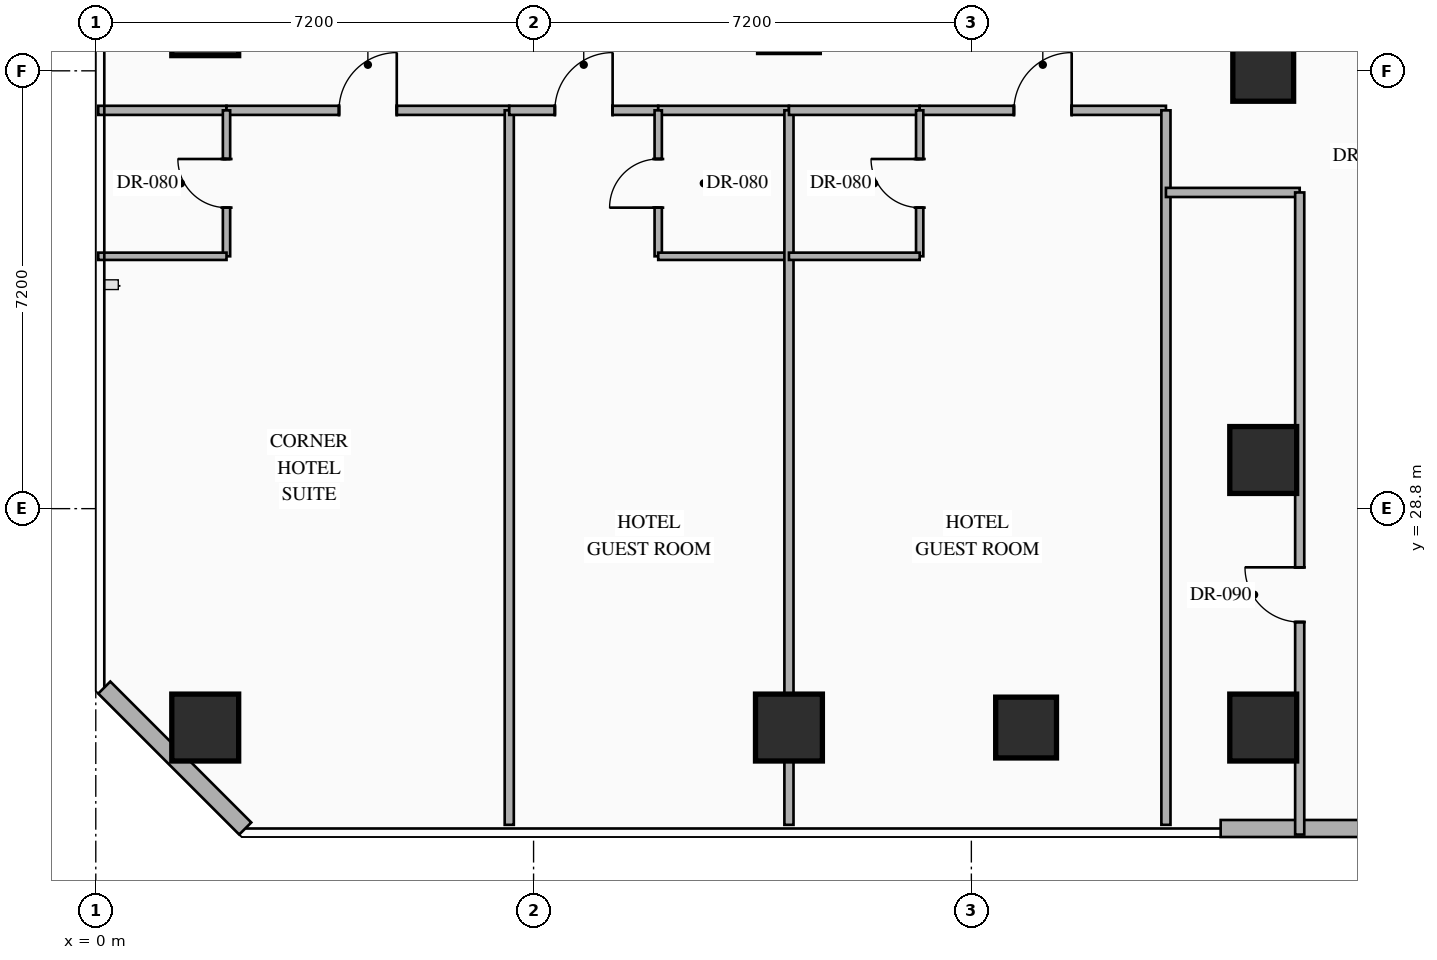
"""IFC4 building model, lengths in metres.
Left out: names, types, materials, properties, quantities, classifications, styles, units other than length and angle.
Written with IfcOpenShell. Run it as: python <this file> out.ifc"""

import sys

from ifc_helpers import new_model, si_unit, direction, frame, frame_2d, origin, origin_2d, place, context, subcontext, project, spatial, rectangle, hollow_rectangle, extrude, element, fill, save


model = new_model("IFC4")
c1 = context("Model", 3, precision=1e-05, world=origin(), true_north=direction((0.0, 1.0)))
c2 = subcontext(c1, "Body", "Model", "MODEL_VIEW")
j1 = project(units=[si_unit("LENGTHUNIT", "METRE"), si_unit("PLANEANGLEUNIT", "RADIAN")], contexts=[c1])
p1 = place(None, origin())
s1 = spatial("IfcSite", under=j1, at=p1, CompositionType="ELEMENT")
p2 = place(p1, origin())
s2 = spatial("IfcBuilding", under=s1, at=p2, CompositionType="ELEMENT")
p3 = place(p2, frame((0.0, 0.0, 60.05)))
s3 = spatial("IfcBuildingStorey", under=s2, at=p3, CompositionType="ELEMENT", Elevation=60.05)
for number, where, z_axis, x_axis in (
    (1, (1.8, 25.2, 0.0), (0.0, 0.0, 1.0), (1.0, 0.0, 0.0)),
    (2, (1.8, 36.8, 0.0), (0.0, 0.0, 1.0), (1.0, 0.0, 0.0)),
    (3, (11.4, 25.2, 0.0), (0.0, 0.0, 1.0), (1.0, 0.0, 0.0)),
    (4, (19.2, 25.2, 0.0), (0.0, 0.0, 1.0), (1.0, 0.0, 0.0)),
    (5, (19.2, 29.6, 0.0), (0.0, 0.0, 1.0), (1.0, 0.0, 0.0)),
):
    element("IfcColumn", number, at=place(p3, frame(where, z_axis=z_axis, x_axis=x_axis)), inside=s3, PredefinedType="COLUMN", context=c2, shape_type="SweptSolid", body=[
        extrude(hollow_rectangle(XDim=1.1, YDim=1.1, WallThickness=0.04, at=origin_2d()), origin(), (0.0, 0.0, 1.0), 3.35),
    ])
for number, where, z_axis, x_axis in (
    (6, (19.2, 36.0, 0.0), (0.0, 0.0, 1.0), (1.0, 0.0, 0.0)),
    (7, (15.3, 25.2, 0.0), (0.0, 0.0, 1.0), (1.0, 0.0, 0.0)),
):
    element("IfcColumn", number, at=place(p3, frame(where, z_axis=z_axis, x_axis=x_axis)), inside=s3, PredefinedType="COLUMN", context=c2, shape_type="SweptSolid", body=[
        extrude(hollow_rectangle(XDim=1.0, YDim=1.0, WallThickness=0.038, at=origin_2d()), origin(), (0.0, 0.0, 1.0), 3.35),
    ])
p4 = place(p3, frame((25.247, 23.54, 0.0), z_axis=(0.0, 0.0, 1.0), x_axis=(-1.0, 0.0, 0.0)))
e8 = element("IfcWall", 8, at=p4, inside=s3, PredefinedType="STANDARD", context=c2, shape_type="SweptSolid", body=[
    extrude(rectangle(XDim=6.747, YDim=0.28, at=frame_2d((3.374, 0.0))), origin(), (0.0, 0.0, 1.0), 3.13),
])
p5 = place(p3, frame((2.458, 23.54, 0.0), z_axis=(0.0, 0.0, 1.0), x_axis=(-0.707144017911, 0.707069542501, 0.0)))
e9 = element("IfcWall", 9, at=p5, inside=s3, PredefinedType="STANDARD", context=c2, shape_type="SweptSolid", body=[
    extrude(rectangle(XDim=3.278, YDim=0.28, at=frame_2d((1.639, 0.0))), origin(), (0.0, 0.0, 1.0), 3.13),
])
p6 = place(p3, frame((0.04, 35.35, 0.0), z_axis=(0.0, 0.0, 1.0), x_axis=(1.0, 0.0, 0.0)))
e10 = element("IfcWall", 10, at=p6, inside=s3, PredefinedType="PARTITIONING", context=c2, shape_type="SweptSolid", body=[
    extrude(rectangle(XDim=2.11, YDim=0.15, at=frame_2d((1.055, 0.0))), origin(), (0.0, 0.0, 1.0), 3.13),
])
p7 = place(p3, frame((2.15, 35.35, 0.0), z_axis=(0.0, 0.0, 1.0), x_axis=(1.0, 0.0, 0.0)))
e11 = element("IfcWall", 11, at=p7, inside=s3, PredefinedType="PARTITIONING", context=c2, shape_type="SweptSolid", body=[
    extrude(rectangle(XDim=4.65, YDim=0.15, at=frame_2d((2.325, 0.0))), origin(), (0.0, 0.0, 1.0), 3.13),
])
p8 = place(p7, frame((1.85, 0.0, 0.0)))
e12 = element("IfcOpeningElement", 12, at=p8, cuts=e11, PredefinedType="OPENING", context=c2, shape_type="SweptSolid", body=[
    extrude(rectangle(XDim=0.95, YDim=2.15, at=frame_2d((0.475, 1.075))), frame((0.0, 0.085, 0.0), z_axis=(0.0, -1.0, 0.0), x_axis=(1.0, 0.0, 0.0)), (0.0, 0.0, 1.0), 0.17),
])
p9 = place(p3, frame((2.15, 32.95, 0.0), z_axis=(0.0, 0.0, 1.0), x_axis=(0.0, 1.0, 0.0)))
e13 = element("IfcWall", 13, at=p9, inside=s3, PredefinedType="PARTITIONING", context=c2, shape_type="SweptSolid", body=[
    extrude(rectangle(XDim=2.4, YDim=0.12, at=frame_2d((1.2, 0.0))), origin(), (0.0, 0.0, 1.0), 3.13),
])
p10 = place(p9, frame((0.8, 0.0, 0.0)))
e14 = element("IfcOpeningElement", 14, at=p10, cuts=e13, PredefinedType="OPENING", context=c2, shape_type="SweptSolid", body=[
    extrude(rectangle(XDim=0.8, YDim=2.06, at=frame_2d((0.4, 1.03))), frame((0.0, 0.07, 0.0), z_axis=(0.0, -1.0, 0.0), x_axis=(1.0, 0.0, 0.0)), (0.0, 0.0, 1.0), 0.14),
])
p11 = place(p3, frame((0.04, 32.95, 0.0), z_axis=(0.0, 0.0, 1.0), x_axis=(1.0, 0.0, 0.0)))
e15 = element("IfcWall", 15, at=p11, inside=s3, PredefinedType="PARTITIONING", context=c2, shape_type="SweptSolid", body=[
    extrude(rectangle(XDim=2.11, YDim=0.12, at=frame_2d((1.055, 0.0))), origin(), (0.0, 0.0, 1.0), 3.13),
])
p12 = place(p3, frame((6.8, 23.6, 0.0), z_axis=(0.0, 0.0, 1.0), x_axis=(0.0, 1.0, 0.0)))
e16 = element("IfcWall", 16, at=p12, inside=s3, PredefinedType="PARTITIONING", context=c2, shape_type="SweptSolid", body=[
    extrude(rectangle(XDim=11.75, YDim=0.15, at=frame_2d((5.875, 0.0))), origin(), (0.0, 0.0, 1.0), 3.13),
])
p13 = place(p3, frame((6.8, 35.35, 0.0), z_axis=(0.0, 0.0, 1.0), x_axis=(1.0, 0.0, 0.0)))
e17 = element("IfcWall", 17, at=p13, inside=s3, PredefinedType="PARTITIONING", context=c2, shape_type="SweptSolid", body=[
    extrude(rectangle(XDim=2.45, YDim=0.15, at=frame_2d((1.225, 0.0))), origin(), (0.0, 0.0, 1.0), 3.13),
])
p14 = place(p13, frame((0.75, 0.0, 0.0)))
e18 = element("IfcOpeningElement", 18, at=p14, cuts=e17, PredefinedType="OPENING", context=c2, shape_type="SweptSolid", body=[
    extrude(rectangle(XDim=0.95, YDim=2.15, at=frame_2d((0.475, 1.075))), frame((0.0, 0.085, 0.0), z_axis=(0.0, -1.0, 0.0), x_axis=(1.0, 0.0, 0.0)), (0.0, 0.0, 1.0), 0.17),
])
p15 = place(p3, frame((9.25, 35.35, 0.0), z_axis=(0.0, 0.0, 1.0), x_axis=(1.0, 0.0, 0.0)))
e19 = element("IfcWall", 19, at=p15, inside=s3, PredefinedType="PARTITIONING", context=c2, shape_type="SweptSolid", body=[
    extrude(rectangle(XDim=2.15, YDim=0.15, at=frame_2d((1.075, 0.0))), origin(), (0.0, 0.0, 1.0), 3.13),
])
p16 = place(p3, frame((9.25, 32.95, 0.0), z_axis=(0.0, 0.0, 1.0), x_axis=(0.0, 1.0, 0.0)))
e20 = element("IfcWall", 20, at=p16, inside=s3, PredefinedType="PARTITIONING", context=c2, shape_type="SweptSolid", body=[
    extrude(rectangle(XDim=2.4, YDim=0.12, at=frame_2d((1.2, 0.0))), origin(), (0.0, 0.0, 1.0), 3.13),
])
p17 = place(p16, frame((0.8, 0.0, 0.0)))
e21 = element("IfcOpeningElement", 21, at=p17, cuts=e20, PredefinedType="OPENING", context=c2, shape_type="SweptSolid", body=[
    extrude(rectangle(XDim=0.8, YDim=2.06, at=frame_2d((0.4, 1.03))), frame((0.0, 0.07, 0.0), z_axis=(0.0, -1.0, 0.0), x_axis=(1.0, 0.0, 0.0)), (0.0, 0.0, 1.0), 0.14),
])
p18 = place(p3, frame((9.25, 32.95, 0.0), z_axis=(0.0, 0.0, 1.0), x_axis=(1.0, 0.0, 0.0)))
e22 = element("IfcWall", 22, at=p18, inside=s3, PredefinedType="PARTITIONING", context=c2, shape_type="SweptSolid", body=[
    extrude(rectangle(XDim=2.15, YDim=0.12, at=frame_2d((1.075, 0.0))), origin(), (0.0, 0.0, 1.0), 3.13),
])
p19 = place(p3, frame((11.4, 23.6, 0.0), z_axis=(0.0, 0.0, 1.0), x_axis=(0.0, 1.0, 0.0)))
e23 = element("IfcWall", 23, at=p19, inside=s3, PredefinedType="PARTITIONING", context=c2, shape_type="SweptSolid", body=[
    extrude(rectangle(XDim=11.75, YDim=0.15, at=frame_2d((5.875, 0.0))), origin(), (0.0, 0.0, 1.0), 2.425),
])
p20 = place(p3, frame((11.4, 35.35, 0.0), z_axis=(0.0, 0.0, 1.0), x_axis=(1.0, 0.0, 0.0)))
e24 = element("IfcWall", 24, at=p20, inside=s3, PredefinedType="PARTITIONING", context=c2, shape_type="SweptSolid", body=[
    extrude(rectangle(XDim=2.15, YDim=0.15, at=frame_2d((1.075, 0.0))), origin(), (0.0, 0.0, 1.0), 3.13),
])
p21 = place(p3, frame((13.55, 35.35, 0.0), z_axis=(0.0, 0.0, 1.0), x_axis=(1.0, 0.0, 0.0)))
e25 = element("IfcWall", 25, at=p21, inside=s3, PredefinedType="PARTITIONING", context=c2, shape_type="SweptSolid", body=[
    extrude(rectangle(XDim=4.05, YDim=0.15, at=frame_2d((2.025, 0.0))), origin(), (0.0, 0.0, 1.0), 3.13),
])
p22 = place(p21, frame((1.55, 0.0, 0.0)))
e26 = element("IfcOpeningElement", 26, at=p22, cuts=e25, PredefinedType="OPENING", context=c2, shape_type="SweptSolid", body=[
    extrude(rectangle(XDim=0.95, YDim=2.15, at=frame_2d((0.475, 1.075))), frame((0.0, 0.085, 0.0), z_axis=(0.0, -1.0, 0.0), x_axis=(1.0, 0.0, 0.0)), (0.0, 0.0, 1.0), 0.17),
])
p23 = place(p3, frame((13.55, 32.95, 0.0), z_axis=(0.0, 0.0, 1.0), x_axis=(0.0, 1.0, 0.0)))
e27 = element("IfcWall", 27, at=p23, inside=s3, PredefinedType="PARTITIONING", context=c2, shape_type="SweptSolid", body=[
    extrude(rectangle(XDim=2.4, YDim=0.12, at=frame_2d((1.2, 0.0))), origin(), (0.0, 0.0, 1.0), 3.13),
])
p24 = place(p23, frame((0.8, 0.0, 0.0)))
e28 = element("IfcOpeningElement", 28, at=p24, cuts=e27, PredefinedType="OPENING", context=c2, shape_type="SweptSolid", body=[
    extrude(rectangle(XDim=0.8, YDim=2.06, at=frame_2d((0.4, 1.03))), frame((0.0, 0.07, 0.0), z_axis=(0.0, -1.0, 0.0), x_axis=(1.0, 0.0, 0.0)), (0.0, 0.0, 1.0), 0.14),
])
p25 = place(p3, frame((11.4, 32.95, 0.0), z_axis=(0.0, 0.0, 1.0), x_axis=(1.0, 0.0, 0.0)))
e29 = element("IfcWall", 29, at=p25, inside=s3, PredefinedType="PARTITIONING", context=c2, shape_type="SweptSolid", body=[
    extrude(rectangle(XDim=2.15, YDim=0.12, at=frame_2d((1.075, 0.0))), origin(), (0.0, 0.0, 1.0), 3.13),
])
p26 = place(p3, frame((17.6, 23.6, 0.0), z_axis=(0.0, 0.0, 1.0), x_axis=(0.0, 1.0, 0.0)))
e30 = element("IfcWall", 30, at=p26, inside=s3, PredefinedType="PARTITIONING", context=c2, shape_type="SweptSolid", body=[
    extrude(rectangle(XDim=11.75, YDim=0.15, at=frame_2d((5.875, 0.0))), origin(), (0.0, 0.0, 1.0), 3.13),
])
p27 = place(p3, frame((17.6, 34.0, 0.0), z_axis=(0.0, 0.0, 1.0), x_axis=(1.0, 0.0, 0.0)))
e31 = element("IfcWall", 31, at=p27, inside=s3, PredefinedType="PARTITIONING", context=c2, shape_type="SweptSolid", body=[
    extrude(rectangle(XDim=2.2, YDim=0.15, at=frame_2d((1.1, 0.0))), origin(), (0.0, 0.0, 1.0), 3.13),
])
p28 = place(p3, frame((19.8, 23.44, 0.0), z_axis=(0.0, 0.0, 1.0), x_axis=(0.0, 1.0, 0.0)))
e32 = element("IfcWall", 32, at=p28, inside=s3, PredefinedType="PARTITIONING", context=c2, shape_type="SweptSolid", body=[
    extrude(rectangle(XDim=10.56, YDim=0.15, at=frame_2d((5.28, 0.0))), origin(), (0.0, 0.0, 1.0), 3.13),
])
p29 = place(p28, frame((3.495, 0.0, 0.0)))
e33 = element("IfcOpeningElement", 33, at=p29, cuts=e32, PredefinedType="OPENING", context=c2, shape_type="SweptSolid", body=[
    extrude(rectangle(XDim=0.9, YDim=2.15, at=frame_2d((0.45, 1.075))), frame((0.0, 0.085, 0.0), z_axis=(0.0, -1.0, 0.0), x_axis=(1.0, 0.0, 0.0)), (0.0, 0.0, 1.0), 0.17),
])
p30 = place(p8, origin())
e34 = element("IfcDoor", 34, at=p30, inside=s3, OperationType="SINGLE_SWING_RIGHT", PredefinedType="DOOR", context=c2, shape_type="SweptSolid", body=[
    extrude(rectangle(XDim=0.95, YDim=2.15, at=frame_2d((0.475, 1.075))), frame((0.0, 0.025, 0.0), z_axis=(0.0, -1.0, 0.0), x_axis=(1.0, 0.0, 0.0)), (0.0, 0.0, 1.0), 0.05),
])
fill(e12, e34)
p31 = place(p10, origin())
e35 = element("IfcDoor", 35, at=p31, inside=s3, OperationType="SINGLE_SWING_RIGHT", PredefinedType="DOOR", context=c2, shape_type="SweptSolid", body=[
    extrude(rectangle(XDim=0.8, YDim=2.06, at=frame_2d((0.4, 1.03))), frame((0.0, 0.025, 0.0), z_axis=(0.0, -1.0, 0.0), x_axis=(1.0, 0.0, 0.0)), (0.0, 0.0, 1.0), 0.05),
])
fill(e14, e35)
p32 = place(p14, origin())
e36 = element("IfcDoor", 36, at=p32, inside=s3, OperationType="SINGLE_SWING_RIGHT", PredefinedType="DOOR", context=c2, shape_type="SweptSolid", body=[
    extrude(rectangle(XDim=0.95, YDim=2.15, at=frame_2d((0.475, 1.075))), frame((0.0, 0.025, 0.0), z_axis=(0.0, -1.0, 0.0), x_axis=(1.0, 0.0, 0.0)), (0.0, 0.0, 1.0), 0.05),
])
fill(e18, e36)
p33 = place(p17, origin())
e37 = element("IfcDoor", 37, at=p33, inside=s3, OperationType="SINGLE_SWING_LEFT", PredefinedType="DOOR", context=c2, shape_type="SweptSolid", body=[
    extrude(rectangle(XDim=0.8, YDim=2.06, at=frame_2d((0.4, 1.03))), frame((0.0, 0.025, 0.0), z_axis=(0.0, -1.0, 0.0), x_axis=(1.0, 0.0, 0.0)), (0.0, 0.0, 1.0), 0.05),
])
fill(e21, e37)
p34 = place(p22, origin())
e38 = element("IfcDoor", 38, at=p34, inside=s3, OperationType="SINGLE_SWING_RIGHT", PredefinedType="DOOR", context=c2, shape_type="SweptSolid", body=[
    extrude(rectangle(XDim=0.95, YDim=2.15, at=frame_2d((0.475, 1.075))), frame((0.0, 0.025, 0.0), z_axis=(0.0, -1.0, 0.0), x_axis=(1.0, 0.0, 0.0)), (0.0, 0.0, 1.0), 0.05),
])
fill(e26, e38)
p35 = place(p24, origin())
e39 = element("IfcDoor", 39, at=p35, inside=s3, OperationType="SINGLE_SWING_RIGHT", PredefinedType="DOOR", context=c2, shape_type="SweptSolid", body=[
    extrude(rectangle(XDim=0.8, YDim=2.06, at=frame_2d((0.4, 1.03))), frame((0.0, 0.025, 0.0), z_axis=(0.0, -1.0, 0.0), x_axis=(1.0, 0.0, 0.0)), (0.0, 0.0, 1.0), 0.05),
])
fill(e28, e39)
p36 = place(p29, origin())
e40 = element("IfcDoor", 40, at=p36, inside=s3, OperationType="SINGLE_SWING_RIGHT", PredefinedType="DOOR", context=c2, shape_type="SweptSolid", body=[
    extrude(rectangle(XDim=0.9, YDim=2.15, at=frame_2d((0.45, 1.075))), frame((0.0, 0.025, 0.0), z_axis=(0.0, -1.0, 0.0), x_axis=(1.0, 0.0, 0.0)), (0.0, 0.0, 1.0), 0.05),
])
fill(e33, e40)
save(model, sys.argv[1])
